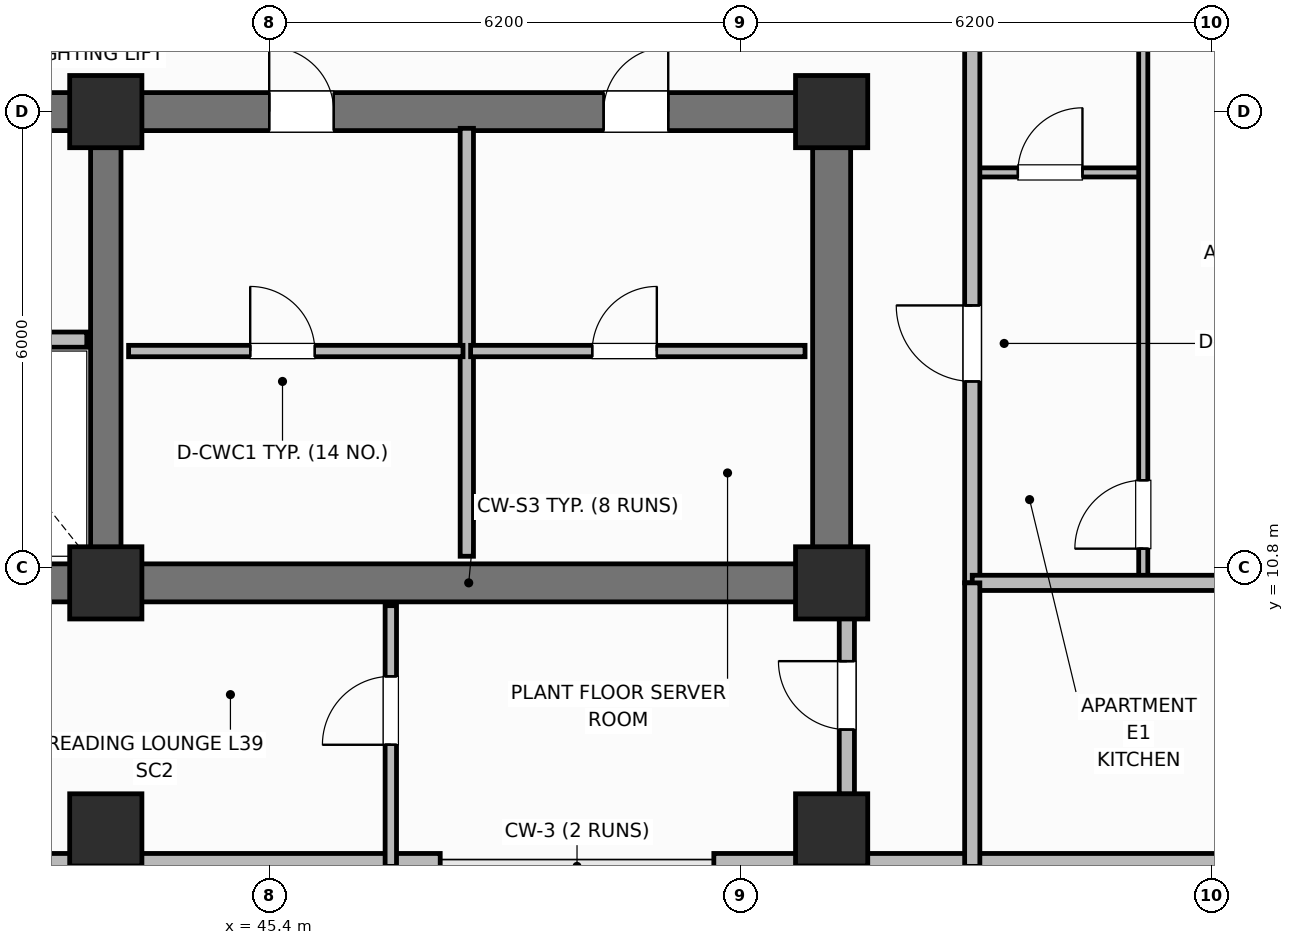
"""IFC4 building model, lengths in metres.
Left out: names, types, materials, properties, quantities, classifications, styles, units other than length and angle.
Written with IfcOpenShell. Run it as: python <this file> out.ifc"""

import sys

from ifc_helpers import new_model, si_unit, direction, frame, frame_2d, origin, origin_2d, place, context, subcontext, project, spatial, rectangle, extrude, element, fill, save


model = new_model("IFC4")
c1 = context("Model", 3, precision=1e-05, world=origin(), true_north=direction((0.0, 1.0)))
c2 = subcontext(c1, "Body", "Model", "MODEL_VIEW")
j1 = project(units=[si_unit("LENGTHUNIT", "METRE"), si_unit("PLANEANGLEUNIT", "RADIAN")], contexts=[c1])
p1 = place(None, origin())
s1 = spatial("IfcSite", under=j1, at=p1, CompositionType="ELEMENT")
p2 = place(p1, origin())
s2 = spatial("IfcBuilding", under=s1, at=p2, CompositionType="ELEMENT")
p3 = place(p2, frame((0.0, 0.0, 158.9)))
s3 = spatial("IfcBuildingStorey", under=s2, at=p3, CompositionType="ELEMENT", Elevation=158.9)
p4 = place(p3, frame((52.8, 10.6, 0.0), z_axis=(0.0, 0.0, 1.0), x_axis=(-1.0, 0.0, 0.0)))
e1 = element("IfcWall", 1, at=p4, inside=s3, PredefinedType="SHEAR", context=c2, shape_type="SweptSolid", body=[
    extrude(rectangle(XDim=27.2, YDim=0.5, at=frame_2d((13.6, 0.0))), origin(), (0.0, 0.0, 1.0), 3.7),
])
p5 = place(p3, frame((52.8, 10.85, 0.0), z_axis=(0.0, 0.0, 1.0), x_axis=(0.0, 1.0, 0.0)))
e2 = element("IfcWall", 2, at=p5, inside=s3, PredefinedType="SHEAR", context=c2, shape_type="SweptSolid", body=[
    extrude(rectangle(XDim=5.7, YDim=0.5, at=frame_2d((2.85, 0.0))), origin(), (0.0, 0.0, 1.0), 3.7),
])
p6 = place(p3, frame((25.6, 16.8, 0.0), z_axis=(0.0, 0.0, 1.0), x_axis=(1.0, 0.0, 0.0)))
e3 = element("IfcWall", 3, at=p6, inside=s3, PredefinedType="SHEAR", context=c2, shape_type="SweptSolid", body=[
    extrude(rectangle(XDim=27.2, YDim=0.5, at=frame_2d((13.6, 0.0))), origin(), (0.0, 0.0, 1.0), 3.7),
])
p7 = place(p6, frame((1.7, 0.0, 0.0)))
e4 = element("IfcOpeningElement", 4, at=p7, cuts=e3, PredefinedType="OPENING", context=c2, shape_type="SweptSolid", body=[
    extrude(rectangle(XDim=1.1, YDim=2.15, at=frame_2d((0.55, 1.075))), frame((0.0, 0.26, 0.0), z_axis=(0.0, -1.0, 0.0), x_axis=(1.0, 0.0, 0.0)), (0.0, 0.0, 1.0), 0.52),
])
p8 = place(p6, frame((4.45, 0.0, 0.0)))
e5 = element("IfcOpeningElement", 5, at=p8, cuts=e3, PredefinedType="OPENING", context=c2, shape_type="SweptSolid", body=[
    extrude(rectangle(XDim=0.85, YDim=2.1, at=frame_2d((0.425, 1.05))), frame((0.0, 0.26, 0.0), z_axis=(0.0, -1.0, 0.0), x_axis=(1.0, 0.0, 0.0)), (0.0, 0.0, 1.0), 0.52),
])
p9 = place(p6, frame((6.5, 0.0, 0.0)))
e6 = element("IfcOpeningElement", 6, at=p9, cuts=e3, PredefinedType="OPENING", context=c2, shape_type="SweptSolid", body=[
    extrude(rectangle(XDim=0.85, YDim=2.1, at=frame_2d((0.425, 1.05))), frame((0.0, 0.26, 0.0), z_axis=(0.0, -1.0, 0.0), x_axis=(1.0, 0.0, 0.0)), (0.0, 0.0, 1.0), 0.52),
])
p10 = place(p6, frame((13.0, 0.0, 0.0)))
e7 = element("IfcOpeningElement", 7, at=p10, cuts=e3, PredefinedType="OPENING", context=c2, shape_type="SweptSolid", body=[
    extrude(rectangle(XDim=1.2, YDim=2.15, at=frame_2d((0.6, 1.075))), frame((0.0, 0.26, 0.0), z_axis=(0.0, -1.0, 0.0), x_axis=(1.0, 0.0, 0.0)), (0.0, 0.0, 1.0), 0.52),
])
p11 = place(p6, frame((19.8, 0.0, 0.0)))
e8 = element("IfcOpeningElement", 8, at=p11, cuts=e3, PredefinedType="OPENING", context=c2, shape_type="SweptSolid", body=[
    extrude(rectangle(XDim=0.85, YDim=2.1, at=frame_2d((0.425, 1.05))), frame((0.0, 0.26, 0.0), z_axis=(0.0, -1.0, 0.0), x_axis=(1.0, 0.0, 0.0)), (0.0, 0.0, 1.0), 0.52),
])
p12 = place(p6, frame((24.2, 0.0, 0.0)))
e9 = element("IfcOpeningElement", 9, at=p12, cuts=e3, PredefinedType="OPENING", context=c2, shape_type="SweptSolid", body=[
    extrude(rectangle(XDim=0.85, YDim=2.1, at=frame_2d((0.425, 1.05))), frame((0.0, 0.26, 0.0), z_axis=(0.0, -1.0, 0.0), x_axis=(1.0, 0.0, 0.0)), (0.0, 0.0, 1.0), 0.52),
])
p13 = place(p3, frame((43.25, 10.85, 0.0), z_axis=(0.0, 0.0, 1.0), x_axis=(0.0, 1.0, 0.0)))
e10 = element("IfcWall", 10, at=p13, inside=s3, PredefinedType="SHEAR", context=c2, shape_type="SweptSolid", body=[
    extrude(rectangle(XDim=5.7, YDim=0.4, at=frame_2d((2.85, 0.0))), origin(), (0.0, 0.0, 1.0), 3.7),
])
for number, where, z_axis, x_axis in (
    (11, (43.25, 10.6, 0.0), (0.0, 0.0, 1.0), (1.0, 0.0, 0.0)),
    (12, (43.25, 16.8, 0.0), (0.0, 0.0, 1.0), (1.0, 0.0, 0.0)),
    (13, (52.8, 10.6, 0.0), (0.0, 0.0, 1.0), (1.0, 0.0, 0.0)),
    (14, (52.8, 16.8, 0.0), (0.0, 0.0, 1.0), (1.0, 0.0, 0.0)),
    (15, (43.25, 7.35, 0.0), (0.0, 0.0, 1.0), (1.0, 0.0, 0.0)),
    (16, (52.8, 7.35, 0.0), (0.0, 0.0, 1.0), (1.0, 0.0, 0.0)),
):
    element("IfcColumn", number, at=place(p3, frame(where, z_axis=z_axis, x_axis=x_axis)), inside=s3, PredefinedType="COLUMN", context=c2, shape_type="SweptSolid", body=[
        extrude(rectangle(XDim=0.95, YDim=0.95, at=origin_2d()), origin(), (0.0, 0.0, 1.0), 3.7),
    ])
p14 = place(p3, frame((42.4, 6.87, 0.0), z_axis=(0.0, 0.0, 1.0), x_axis=(1.0, 0.0, 0.0)))
e17 = element("IfcWall", 17, at=p14, inside=s3, PredefinedType="SOLIDWALL", context=c2, shape_type="SweptSolid", body=[
    extrude(rectangle(XDim=5.25, YDim=0.34, at=frame_2d((2.625, 0.0))), origin(), (0.0, 0.0, 1.0), 2.72),
])
p15 = place(p3, frame((51.25, 6.87, 0.0), z_axis=(0.0, 0.0, 1.0), x_axis=(1.0, 0.0, 0.0)))
e18 = element("IfcWall", 18, at=p15, inside=s3, PredefinedType="SOLIDWALL", context=c2, shape_type="SweptSolid", body=[
    extrude(rectangle(XDim=6.95, YDim=0.34, at=frame_2d((3.475, 0.0))), origin(), (0.0, 0.0, 1.0), 2.72),
])
p16 = place(p3, frame((35.4, 13.8, 0.0), z_axis=(0.0, 0.0, 1.0), x_axis=(1.0, 0.0, 0.0)))
e19 = element("IfcWall", 19, at=p16, inside=s3, PredefinedType="PARTITIONING", context=c2, shape_type="SweptSolid", body=[
    extrude(rectangle(XDim=7.6, YDim=0.2, at=frame_2d((3.8, 0.0))), origin(), (0.0, 0.0, 1.0), 2.32),
])
p17 = place(p16, frame((0.7, 0.0, 0.0)))
e20 = element("IfcOpeningElement", 20, at=p17, cuts=e19, PredefinedType="OPENING", context=c2, shape_type="SweptSolid", body=[
    extrude(rectangle(XDim=1.1, YDim=2.15, at=frame_2d((0.55, 1.075))), frame((0.0, 0.11, 0.0), z_axis=(0.0, -1.0, 0.0), x_axis=(1.0, 0.0, 0.0)), (0.0, 0.0, 1.0), 0.22),
])
p18 = place(p16, frame((3.35, 0.0, 0.0)))
e21 = element("IfcOpeningElement", 21, at=p18, cuts=e19, PredefinedType="OPENING", context=c2, shape_type="SweptSolid", body=[
    extrude(rectangle(XDim=1.2, YDim=2.15, at=frame_2d((0.6, 1.075))), frame((0.0, 0.11, 0.0), z_axis=(0.0, -1.0, 0.0), x_axis=(1.0, 0.0, 0.0)), (0.0, 0.0, 1.0), 0.22),
])
p19 = place(p3, frame((48.0, 10.95, 0.0), z_axis=(0.0, 0.0, 1.0), x_axis=(0.0, 1.0, 0.0)))
e22 = element("IfcWall", 22, at=p19, inside=s3, PredefinedType="PARTITIONING", context=c2, shape_type="SweptSolid", body=[
    extrude(rectangle(XDim=5.63, YDim=0.175, at=frame_2d((2.815, 0.0))), origin(), (0.0, 0.0, 1.0), 2.55),
])
p20 = place(p3, frame((43.55, 13.65, 0.0), z_axis=(0.0, 0.0, 1.0), x_axis=(1.0, 0.0, 0.0)))
e23 = element("IfcWall", 23, at=p20, inside=s3, PredefinedType="PARTITIONING", context=c2, shape_type="SweptSolid", body=[
    extrude(rectangle(XDim=4.4, YDim=0.15, at=frame_2d((2.2, 0.0))), origin(), (0.0, 0.0, 1.0), 2.55),
])
p21 = place(p20, frame((1.6, 0.0, 0.0)))
e24 = element("IfcOpeningElement", 24, at=p21, cuts=e23, PredefinedType="OPENING", context=c2, shape_type="SweptSolid", body=[
    extrude(rectangle(XDim=0.85, YDim=2.1, at=frame_2d((0.425, 1.05))), frame((0.0, 0.085, 0.0), z_axis=(0.0, -1.0, 0.0), x_axis=(1.0, 0.0, 0.0)), (0.0, 0.0, 1.0), 0.17),
])
p22 = place(p3, frame((48.05, 13.65, 0.0), z_axis=(0.0, 0.0, 1.0), x_axis=(1.0, 0.0, 0.0)))
e25 = element("IfcWall", 25, at=p22, inside=s3, PredefinedType="PARTITIONING", context=c2, shape_type="SweptSolid", body=[
    extrude(rectangle(XDim=4.4, YDim=0.15, at=frame_2d((2.2, 0.0))), origin(), (0.0, 0.0, 1.0), 2.55),
])
p23 = place(p22, frame((1.6, 0.0, 0.0)))
e26 = element("IfcOpeningElement", 26, at=p23, cuts=e25, PredefinedType="OPENING", context=c2, shape_type="SweptSolid", body=[
    extrude(rectangle(XDim=0.85, YDim=2.1, at=frame_2d((0.425, 1.05))), frame((0.0, 0.085, 0.0), z_axis=(0.0, -1.0, 0.0), x_axis=(1.0, 0.0, 0.0)), (0.0, 0.0, 1.0), 0.17),
])
p24 = place(p3, frame((54.65, 16.0, 0.0), z_axis=(0.0, 0.0, 1.0), x_axis=(1.0, 0.0, 0.0)))
e27 = element("IfcWall", 27, at=p24, inside=s3, PredefinedType="PARTITIONING", context=c2, shape_type="SweptSolid", body=[
    extrude(rectangle(XDim=2.25, YDim=0.12, at=frame_2d((1.125, 0.0))), origin(), (0.0, 0.0, 1.0), 2.55),
])
p25 = place(p24, frame((0.6, 0.0, 0.0)))
e28 = element("IfcOpeningElement", 28, at=p25, cuts=e27, PredefinedType="OPENING", context=c2, shape_type="SweptSolid", body=[
    extrude(rectangle(XDim=0.85, YDim=2.1, at=frame_2d((0.425, 1.05))), frame((0.0, 0.07, 0.0), z_axis=(0.0, -1.0, 0.0), x_axis=(1.0, 0.0, 0.0)), (0.0, 0.0, 1.0), 0.14),
])
p26 = place(p3, frame((56.9, 10.64, 0.0), z_axis=(0.0, 0.0, 1.0), x_axis=(0.0, 1.0, 0.0)))
e29 = element("IfcWall", 29, at=p26, inside=s3, PredefinedType="PARTITIONING", context=c2, shape_type="SweptSolid", body=[
    extrude(rectangle(XDim=19.12, YDim=0.12, at=frame_2d((9.56, 0.0))), origin(), (0.0, 0.0, 1.0), 2.55),
])
p27 = place(p26, frame((0.41, 0.0, 0.0)))
e30 = element("IfcOpeningElement", 30, at=p27, cuts=e29, PredefinedType="OPENING", context=c2, shape_type="SweptSolid", body=[
    extrude(rectangle(XDim=0.9, YDim=2.1, at=frame_2d((0.45, 1.05))), frame((0.0, 0.07, 0.0), z_axis=(0.0, -1.0, 0.0), x_axis=(1.0, 0.0, 0.0)), (0.0, 0.0, 1.0), 0.14),
])
p28 = place(p26, frame((13.735, 0.0, 0.0)))
e31 = element("IfcOpeningElement", 31, at=p28, cuts=e29, PredefinedType="OPENING", context=c2, shape_type="SweptSolid", body=[
    extrude(rectangle(XDim=0.82, YDim=2.08, at=frame_2d((0.41, 1.04))), frame((0.0, 0.07, 0.0), z_axis=(0.0, -1.0, 0.0), x_axis=(1.0, 0.0, 0.0)), (0.0, 0.0, 1.0), 0.14),
])
p29 = place(p3, frame((54.65, 10.6, 0.0), z_axis=(0.0, 0.0, 1.0), x_axis=(0.0, 1.0, 0.0)))
e32 = element("IfcWall", 32, at=p29, inside=s3, PredefinedType="PARTITIONING", context=c2, shape_type="SweptSolid", body=[
    extrude(rectangle(XDim=35.2, YDim=0.2, at=frame_2d((17.6, 0.0))), origin(), (0.0, 0.0, 1.0), 2.55),
])
p30 = place(p29, frame((2.65, 0.0, 0.0)))
e33 = element("IfcOpeningElement", 33, at=p30, cuts=e32, PredefinedType="OPENING", context=c2, shape_type="SweptSolid", body=[
    extrude(rectangle(XDim=1.0, YDim=2.15, at=frame_2d((0.5, 1.075))), frame((0.0, 0.11, 0.0), z_axis=(0.0, -1.0, 0.0), x_axis=(1.0, 0.0, 0.0)), (0.0, 0.0, 1.0), 0.22),
])
p31 = place(p29, frame((22.75, 0.0, 0.0)))
e34 = element("IfcOpeningElement", 34, at=p31, cuts=e32, PredefinedType="OPENING", context=c2, shape_type="SweptSolid", body=[
    extrude(rectangle(XDim=1.0, YDim=2.15, at=frame_2d((0.5, 1.075))), frame((0.0, 0.11, 0.0), z_axis=(0.0, -1.0, 0.0), x_axis=(1.0, 0.0, 0.0)), (0.0, 0.0, 1.0), 0.22),
])
p32 = place(p3, frame((54.65, 10.6, 0.0), z_axis=(0.0, 0.0, 1.0), x_axis=(1.0, 0.0, 0.0)))
e35 = element("IfcWall", 35, at=p32, inside=s3, PredefinedType="PARTITIONING", context=c2, shape_type="SweptSolid", body=[
    extrude(rectangle(XDim=6.76, YDim=0.2, at=frame_2d((3.38, 0.0))), origin(), (0.0, 0.0, 1.0), 2.55),
])
p33 = place(p3, frame((54.65, 6.87, 0.0), z_axis=(0.0, 0.0, 1.0), x_axis=(0.0, 1.0, 0.0)))
e36 = element("IfcWall", 36, at=p33, inside=s3, PredefinedType="PARTITIONING", context=c2, shape_type="SweptSolid", body=[
    extrude(rectangle(XDim=3.73, YDim=0.2, at=frame_2d((1.865, 0.0))), origin(), (0.0, 0.0, 1.0), 2.55),
])
p34 = place(p3, frame((47.0, 6.87, 0.0), z_axis=(0.0, 0.0, 1.0), x_axis=(0.0, 1.0, 0.0)))
e37 = element("IfcWall", 37, at=p34, inside=s3, PredefinedType="PARTITIONING", context=c2, shape_type="SweptSolid", body=[
    extrude(rectangle(XDim=3.43, YDim=0.15, at=frame_2d((1.715, 0.0))), origin(), (0.0, 0.0, 1.0), 2.55),
])
p35 = place(p34, frame((1.6, 0.0, 0.0)))
e38 = element("IfcOpeningElement", 38, at=p35, cuts=e37, PredefinedType="OPENING", context=c2, shape_type="SweptSolid", body=[
    extrude(rectangle(XDim=0.9, YDim=2.1, at=frame_2d((0.45, 1.05))), frame((0.0, 0.085, 0.0), z_axis=(0.0, -1.0, 0.0), x_axis=(1.0, 0.0, 0.0)), (0.0, 0.0, 1.0), 0.17),
])
p36 = place(p3, frame((53.0, 7.82, 0.0), z_axis=(0.0, 0.0, 1.0), x_axis=(0.0, 1.0, 0.0)))
e39 = element("IfcWall", 39, at=p36, inside=s3, PredefinedType="PARTITIONING", context=c2, shape_type="SweptSolid", body=[
    extrude(rectangle(XDim=2.48, YDim=0.2, at=frame_2d((1.24, 0.0))), origin(), (0.0, 0.0, 1.0), 2.55),
])
p37 = place(p36, frame((0.85, 0.0, 0.0)))
e40 = element("IfcOpeningElement", 40, at=p37, cuts=e39, PredefinedType="OPENING", context=c2, shape_type="SweptSolid", body=[
    extrude(rectangle(XDim=0.9, YDim=2.1, at=frame_2d((0.45, 1.05))), frame((0.0, 0.11, 0.0), z_axis=(0.0, -1.0, 0.0), x_axis=(1.0, 0.0, 0.0)), (0.0, 0.0, 1.0), 0.22),
])
p38 = place(p21, origin())
e41 = element("IfcDoor", 41, at=p38, inside=s3, OperationType="SINGLE_SWING_LEFT", PredefinedType="DOOR", context=c2, shape_type="SweptSolid", body=[
    extrude(rectangle(XDim=0.85, YDim=2.1, at=frame_2d((0.425, 1.05))), frame((0.0, 0.025, 0.0), z_axis=(0.0, -1.0, 0.0), x_axis=(1.0, 0.0, 0.0)), (0.0, 0.0, 1.0), 0.05),
])
fill(e24, e41)
p39 = place(p23, origin())
e42 = element("IfcDoor", 42, at=p39, inside=s3, OperationType="SINGLE_SWING_RIGHT", PredefinedType="DOOR", context=c2, shape_type="SweptSolid", body=[
    extrude(rectangle(XDim=0.85, YDim=2.1, at=frame_2d((0.425, 1.05))), frame((0.0, 0.025, 0.0), z_axis=(0.0, -1.0, 0.0), x_axis=(1.0, 0.0, 0.0)), (0.0, 0.0, 1.0), 0.05),
])
fill(e26, e42)
p40 = place(p25, origin())
e43 = element("IfcDoor", 43, at=p40, inside=s3, OperationType="SINGLE_SWING_RIGHT", PredefinedType="DOOR", context=c2, shape_type="SweptSolid", body=[
    extrude(rectangle(XDim=0.85, YDim=2.1, at=frame_2d((0.425, 1.05))), frame((0.0, 0.025, 0.0), z_axis=(0.0, -1.0, 0.0), x_axis=(1.0, 0.0, 0.0)), (0.0, 0.0, 1.0), 0.05),
])
fill(e28, e43)
p41 = place(p27, origin())
e44 = element("IfcDoor", 44, at=p41, inside=s3, OperationType="SINGLE_SWING_LEFT", PredefinedType="DOOR", context=c2, shape_type="SweptSolid", body=[
    extrude(rectangle(XDim=0.9, YDim=2.1, at=frame_2d((0.45, 1.05))), frame((0.0, 0.025, 0.0), z_axis=(0.0, -1.0, 0.0), x_axis=(1.0, 0.0, 0.0)), (0.0, 0.0, 1.0), 0.05),
])
fill(e30, e44)
p42 = place(p30, origin())
e45 = element("IfcDoor", 45, at=p42, inside=s3, OperationType="SINGLE_SWING_RIGHT", PredefinedType="DOOR", context=c2, shape_type="SweptSolid", body=[
    extrude(rectangle(XDim=1.0, YDim=2.15, at=frame_2d((0.5, 1.075))), frame((0.0, 0.025, 0.0), z_axis=(0.0, -1.0, 0.0), x_axis=(1.0, 0.0, 0.0)), (0.0, 0.0, 1.0), 0.05),
])
fill(e33, e45)
p43 = place(p35, origin())
e46 = element("IfcDoor", 46, at=p43, inside=s3, OperationType="SINGLE_SWING_LEFT", PredefinedType="DOOR", context=c2, shape_type="SweptSolid", body=[
    extrude(rectangle(XDim=0.9, YDim=2.1, at=frame_2d((0.45, 1.05))), frame((0.0, 0.025, 0.0), z_axis=(0.0, -1.0, 0.0), x_axis=(1.0, 0.0, 0.0)), (0.0, 0.0, 1.0), 0.05),
])
fill(e38, e46)
p44 = place(p37, origin())
e47 = element("IfcDoor", 47, at=p44, inside=s3, OperationType="SINGLE_SWING_RIGHT", PredefinedType="DOOR", context=c2, shape_type="SweptSolid", body=[
    extrude(rectangle(XDim=0.9, YDim=2.1, at=frame_2d((0.45, 1.05))), frame((0.0, 0.025, 0.0), z_axis=(0.0, -1.0, 0.0), x_axis=(1.0, 0.0, 0.0)), (0.0, 0.0, 1.0), 0.05),
])
fill(e40, e47)
p45 = place(p11, origin())
e48 = element("IfcDoor", 48, at=p45, inside=s3, OperationType="SINGLE_SWING_LEFT", PredefinedType="DOOR", context=c2, shape_type="SweptSolid", body=[
    extrude(rectangle(XDim=0.85, YDim=2.1, at=frame_2d((0.425, 1.05))), frame((0.0, 0.025, 0.0), z_axis=(0.0, -1.0, 0.0), x_axis=(1.0, 0.0, 0.0)), (0.0, 0.0, 1.0), 0.05),
])
fill(e8, e48)
p46 = place(p12, origin())
e49 = element("IfcDoor", 49, at=p46, inside=s3, OperationType="SINGLE_SWING_RIGHT", PredefinedType="DOOR", context=c2, shape_type="SweptSolid", body=[
    extrude(rectangle(XDim=0.85, YDim=2.1, at=frame_2d((0.425, 1.05))), frame((0.0, 0.025, 0.0), z_axis=(0.0, -1.0, 0.0), x_axis=(1.0, 0.0, 0.0)), (0.0, 0.0, 1.0), 0.05),
])
fill(e9, e49)
save(model, sys.argv[1])
